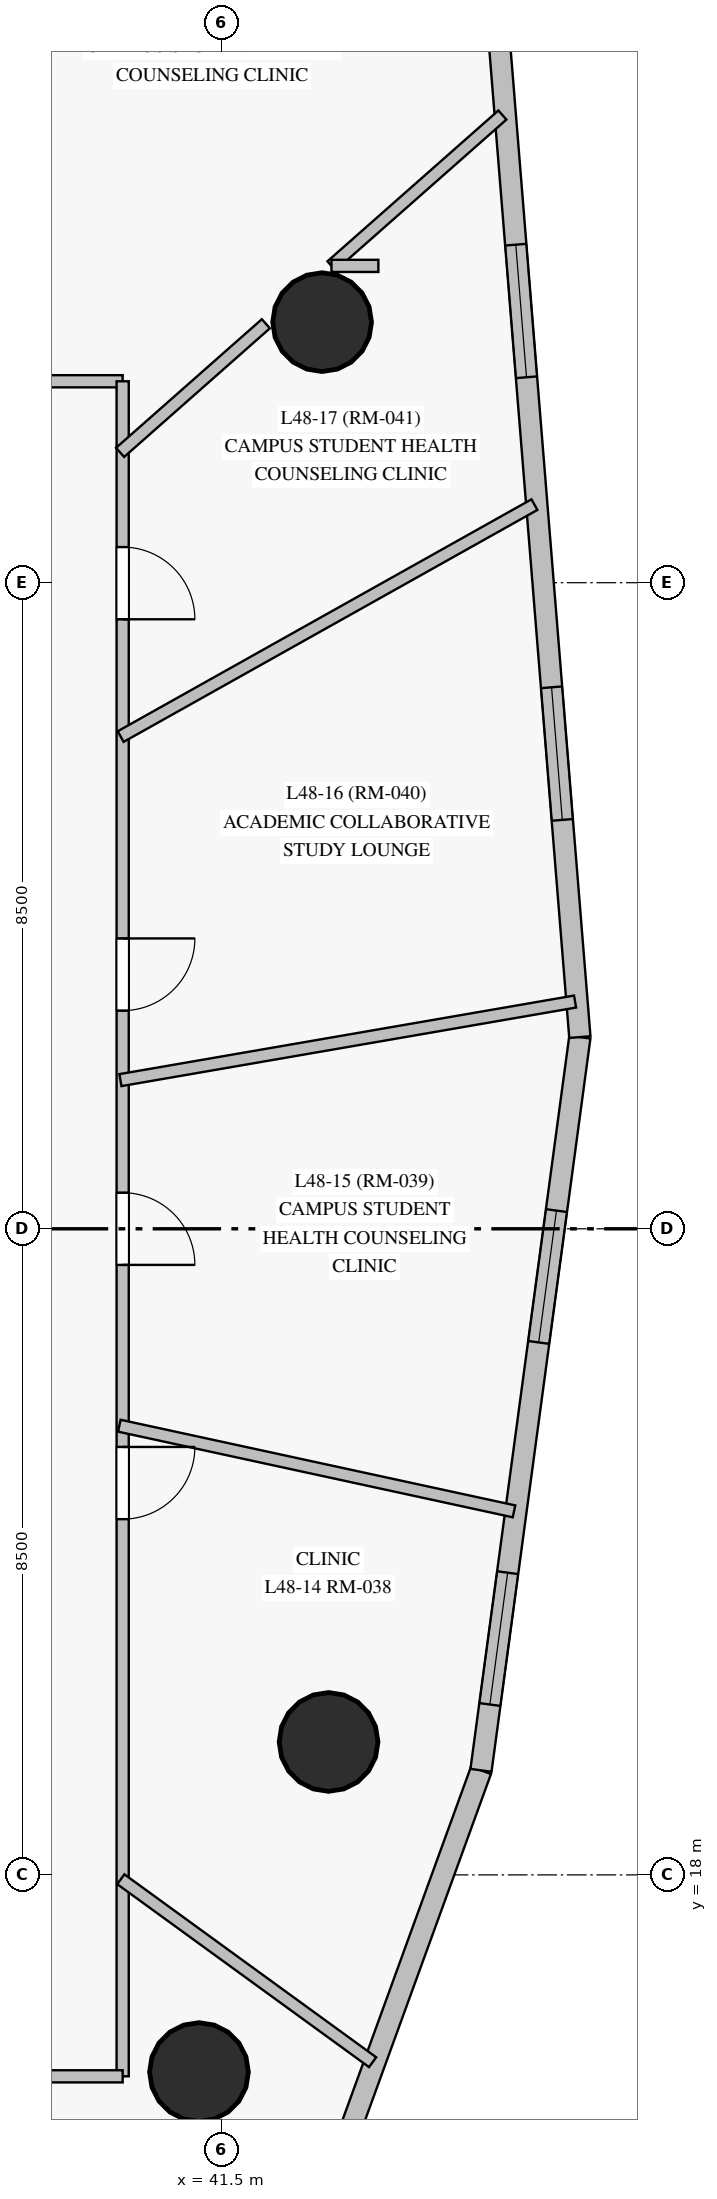
"""IFC4 building model, lengths in metres.
Left out: names, types, materials, properties, quantities, classifications, styles, units other than length and angle.
Written with IfcOpenShell. Run it as: python <this file> out.ifc"""

import sys

from ifc_helpers import new_model, si_unit, direction, frame, frame_2d, origin, origin_with_axes, origin_2d, place, context, subcontext, project, spatial, rectangle, circle, extrude, source, transform, mapped, element, fill, save


model = new_model("IFC4")
c1 = context("Model", 3, precision=1e-05, world=origin(), true_north=direction((0.0, 1.0)))
c2 = subcontext(c1, "Body", "Model", "MODEL_VIEW")
j1 = project(units=[si_unit("LENGTHUNIT", "METRE"), si_unit("PLANEANGLEUNIT", "RADIAN")], contexts=[c1])
p1 = place(None, origin())
s1 = spatial("IfcSite", under=j1, at=p1, CompositionType="ELEMENT")
p2 = place(p1, origin())
s2 = spatial("IfcBuilding", under=s1, at=p2, CompositionType="ELEMENT")
p3 = place(p2, frame((0.0, 0.0, 168.75)))
s3 = spatial("IfcBuildingStorey", under=s2, at=p3, CompositionType="ELEMENT", Elevation=168.75)
m1 = source(origin_with_axes(), c2, "Body", "SweptSolid", [
    extrude(circle(Radius=0.65, at=origin_2d()), origin(), (0.0, 0.0, 1.0), 3.05),
])
for number, where, z_axis, x_axis in (
    (1, (42.909, 19.749, 0.0), (0.0, 0.0, 1.0), (1.0, 0.0, 0.0)),
    (2, (42.824, 38.428, 0.0), (0.0, 0.0, 1.0), (1.0, 0.0, 0.0)),
    (3, (41.204, 15.406, 0.0), (0.0, 0.0, 1.0), (1.0, 0.0, 0.0)),
):
    element("IfcColumn", number, at=place(p3, frame(where, z_axis=z_axis, x_axis=x_axis)), inside=s3, PredefinedType="COLUMN", context=c2, shape_type="MappedRepresentation", body=[
        mapped(m1, transform((0.0, 0.0, 0.0), scale=1.0)),
    ])
p4 = place(p3, frame((40.122, 6.197, 0.0), z_axis=(0.0, 0.0, 1.0), x_axis=(0.341766826374, 0.939784781953, 0.0)))
e4 = element("IfcWall", 4, at=p4, inside=s3, PredefinedType="SOLIDWALL", context=c2, shape_type="SweptSolid", body=[
    extrude(rectangle(XDim=14.023, YDim=0.28, at=frame_2d((7.012, 0.0))), origin(), (0.0, 0.0, 1.0), 2.495),
])
p5 = place(p3, frame((44.914, 19.376, 0.0), z_axis=(0.0, 0.0, 1.0), x_axis=(0.133638943634, 0.9910300867, 0.0)))
e5 = element("IfcWall", 5, at=p5, inside=s3, PredefinedType="SOLIDWALL", context=c2, shape_type="SweptSolid", body=[
    extrude(rectangle(XDim=9.734, YDim=0.28, at=frame_2d((4.867, 0.0))), origin(), (0.0, 0.0, 1.0), 2.825),
])
p6 = place(p5, frame((0.874, 0.0, 0.85)))
e6 = element("IfcOpeningElement", 6, at=p6, cuts=e5, PredefinedType="OPENING", context=c2, shape_type="SweptSolid", body=[
    extrude(rectangle(XDim=1.75, YDim=1.65, at=frame_2d((0.875, 0.825))), frame((0.0, 0.15, 0.0), z_axis=(0.0, -1.0, 0.0), x_axis=(1.0, 0.0, 0.0)), (0.0, 0.0, 1.0), 0.3),
])
p7 = place(p5, frame((5.68, 0.0, 0.85)))
e7 = element("IfcOpeningElement", 7, at=p7, cuts=e5, PredefinedType="OPENING", context=c2, shape_type="SweptSolid", body=[
    extrude(rectangle(XDim=1.75, YDim=1.65, at=frame_2d((0.875, 0.825))), frame((0.0, 0.15, 0.0), z_axis=(0.0, -1.0, 0.0), x_axis=(1.0, 0.0, 0.0)), (0.0, 0.0, 1.0), 0.3),
])
p8 = place(p3, frame((46.215, 29.022, 0.0), z_axis=(0.0, 0.0, 1.0), x_axis=(-0.080623276525, 0.996744644973, 0.0)))
e8 = element("IfcWall", 8, at=p8, inside=s3, PredefinedType="SOLIDWALL", context=c2, shape_type="SweptSolid", body=[
    extrude(rectangle(XDim=14.023, YDim=0.28, at=frame_2d((7.012, 0.0))), origin(), (0.0, 0.0, 1.0), 2.825),
])
p9 = place(p8, frame((2.867, 0.0, 0.85)))
e9 = element("IfcOpeningElement", 9, at=p9, cuts=e8, PredefinedType="OPENING", context=c2, shape_type="SweptSolid", body=[
    extrude(rectangle(XDim=1.75, YDim=1.65, at=frame_2d((0.875, 0.825))), frame((0.0, 0.15, 0.0), z_axis=(0.0, -1.0, 0.0), x_axis=(1.0, 0.0, 0.0)), (0.0, 0.0, 1.0), 0.3),
])
p10 = place(p8, frame((8.709, 0.0, 0.85)))
e10 = element("IfcOpeningElement", 10, at=p10, cuts=e8, PredefinedType="OPENING", context=c2, shape_type="SweptSolid", body=[
    extrude(rectangle(XDim=1.75, YDim=1.65, at=frame_2d((0.875, 0.825))), frame((0.0, 0.15, 0.0), z_axis=(0.0, -1.0, 0.0), x_axis=(1.0, 0.0, 0.0)), (0.0, 0.0, 1.0), 0.3),
])
p11 = place(p3, frame((16.7, 37.65, 0.0), z_axis=(0.0, 0.0, 1.0), x_axis=(1.0, 0.0, 0.0)))
e11 = element("IfcWall", 11, at=p11, inside=s3, PredefinedType="PARTITIONING", context=c2, shape_type="SweptSolid", body=[
    extrude(rectangle(XDim=23.5, YDim=0.16, at=frame_2d((11.75, 0.0))), origin(), (0.0, 0.0, 1.0), 2.375),
])
p12 = place(p11, frame((20.632, 0.0, 0.0)))
e12 = element("IfcOpeningElement", 12, at=p12, cuts=e11, PredefinedType="OPENING", context=c2, shape_type="SweptSolid", body=[
    extrude(rectangle(XDim=0.95, YDim=2.15, at=frame_2d((0.475, 1.075))), frame((0.0, 0.09, 0.0), z_axis=(0.0, -1.0, 0.0), x_axis=(1.0, 0.0, 0.0)), (0.0, 0.0, 1.0), 0.18),
])
p13 = place(p11, frame((17.34, 0.0, 0.0)))
e13 = element("IfcOpeningElement", 13, at=p13, cuts=e11, PredefinedType="OPENING", context=c2, shape_type="SweptSolid", body=[
    extrude(rectangle(XDim=0.95, YDim=2.15, at=frame_2d((0.475, 1.075))), frame((0.0, 0.09, 0.0), z_axis=(0.0, -1.0, 0.0), x_axis=(1.0, 0.0, 0.0)), (0.0, 0.0, 1.0), 0.18),
])
p14 = place(p11, frame((15.24, 0.0, 0.0)))
e14 = element("IfcOpeningElement", 14, at=p14, cuts=e11, PredefinedType="OPENING", context=c2, shape_type="SweptSolid", body=[
    extrude(rectangle(XDim=0.95, YDim=2.15, at=frame_2d((0.475, 1.075))), frame((0.0, 0.09, 0.0), z_axis=(0.0, -1.0, 0.0), x_axis=(1.0, 0.0, 0.0)), (0.0, 0.0, 1.0), 0.18),
])
p15 = place(p11, frame((13.482, 0.0, 0.0)))
e15 = element("IfcOpeningElement", 15, at=p15, cuts=e11, PredefinedType="OPENING", context=c2, shape_type="SweptSolid", body=[
    extrude(rectangle(XDim=0.95, YDim=2.15, at=frame_2d((0.475, 1.075))), frame((0.0, 0.09, 0.0), z_axis=(0.0, -1.0, 0.0), x_axis=(1.0, 0.0, 0.0)), (0.0, 0.0, 1.0), 0.18),
])
p16 = place(p11, frame((11.365, 0.0, 0.0)))
e16 = element("IfcOpeningElement", 16, at=p16, cuts=e11, PredefinedType="OPENING", context=c2, shape_type="SweptSolid", body=[
    extrude(rectangle(XDim=0.95, YDim=2.15, at=frame_2d((0.475, 1.075))), frame((0.0, 0.09, 0.0), z_axis=(0.0, -1.0, 0.0), x_axis=(1.0, 0.0, 0.0)), (0.0, 0.0, 1.0), 0.18),
])
p17 = place(p11, frame((9.588, 0.0, 0.0)))
e17 = element("IfcOpeningElement", 17, at=p17, cuts=e11, PredefinedType="OPENING", context=c2, shape_type="SweptSolid", body=[
    extrude(rectangle(XDim=0.95, YDim=2.15, at=frame_2d((0.475, 1.075))), frame((0.0, 0.09, 0.0), z_axis=(0.0, -1.0, 0.0), x_axis=(1.0, 0.0, 0.0)), (0.0, 0.0, 1.0), 0.18),
])
p18 = place(p11, frame((7.75, 0.0, 0.0)))
e18 = element("IfcOpeningElement", 18, at=p18, cuts=e11, PredefinedType="OPENING", context=c2, shape_type="SweptSolid", body=[
    extrude(rectangle(XDim=0.95, YDim=2.15, at=frame_2d((0.475, 1.075))), frame((0.0, 0.09, 0.0), z_axis=(0.0, -1.0, 0.0), x_axis=(1.0, 0.0, 0.0)), (0.0, 0.0, 1.0), 0.18),
])
p19 = place(p11, frame((5.4, 0.0, 0.0)))
e19 = element("IfcOpeningElement", 19, at=p19, cuts=e11, PredefinedType="OPENING", context=c2, shape_type="SweptSolid", body=[
    extrude(rectangle(XDim=0.95, YDim=2.15, at=frame_2d((0.475, 1.075))), frame((0.0, 0.09, 0.0), z_axis=(0.0, -1.0, 0.0), x_axis=(1.0, 0.0, 0.0)), (0.0, 0.0, 1.0), 0.18),
])
p20 = place(p11, frame((1.277, 0.0, 0.0)))
e20 = element("IfcOpeningElement", 20, at=p20, cuts=e11, PredefinedType="OPENING", context=c2, shape_type="SweptSolid", body=[
    extrude(rectangle(XDim=0.86, YDim=2.04, at=frame_2d((0.43, 1.02))), frame((0.0, 0.09, 0.0), z_axis=(0.0, -1.0, 0.0), x_axis=(1.0, 0.0, 0.0)), (0.0, 0.0, 1.0), 0.18),
])
p21 = place(p3, frame((40.2, 37.65, 0.0), z_axis=(0.0, 0.0, 1.0), x_axis=(0.0, -1.0, 0.0)))
e21 = element("IfcWall", 21, at=p21, inside=s3, PredefinedType="PARTITIONING", context=c2, shape_type="SweptSolid", body=[
    extrude(rectangle(XDim=22.3, YDim=0.16, at=frame_2d((11.15, 0.0))), origin(), (0.0, 0.0, 1.0), 2.375),
])
p22 = place(p21, frame((14.02, 0.0, 0.0)))
e22 = element("IfcOpeningElement", 22, at=p22, cuts=e21, PredefinedType="OPENING", context=c2, shape_type="SweptSolid", body=[
    extrude(rectangle(XDim=0.95, YDim=2.15, at=frame_2d((0.475, 1.075))), frame((0.0, 0.09, 0.0), z_axis=(0.0, -1.0, 0.0), x_axis=(1.0, 0.0, 0.0)), (0.0, 0.0, 1.0), 0.18),
])
p23 = place(p21, frame((10.675, 0.0, 0.0)))
e23 = element("IfcOpeningElement", 23, at=p23, cuts=e21, PredefinedType="OPENING", context=c2, shape_type="SweptSolid", body=[
    extrude(rectangle(XDim=0.95, YDim=2.15, at=frame_2d((0.475, 1.075))), frame((0.0, 0.09, 0.0), z_axis=(0.0, -1.0, 0.0), x_axis=(1.0, 0.0, 0.0)), (0.0, 0.0, 1.0), 0.18),
])
p24 = place(p21, frame((7.33, 0.0, 0.0)))
e24 = element("IfcOpeningElement", 24, at=p24, cuts=e21, PredefinedType="OPENING", context=c2, shape_type="SweptSolid", body=[
    extrude(rectangle(XDim=0.95, YDim=2.15, at=frame_2d((0.475, 1.075))), frame((0.0, 0.09, 0.0), z_axis=(0.0, -1.0, 0.0), x_axis=(1.0, 0.0, 0.0)), (0.0, 0.0, 1.0), 0.18),
])
p25 = place(p21, frame((2.181, 0.0, 0.0)))
e25 = element("IfcOpeningElement", 25, at=p25, cuts=e21, PredefinedType="OPENING", context=c2, shape_type="SweptSolid", body=[
    extrude(rectangle(XDim=0.95, YDim=2.15, at=frame_2d((0.475, 1.075))), frame((0.0, 0.09, 0.0), z_axis=(0.0, -1.0, 0.0), x_axis=(1.0, 0.0, 0.0)), (0.0, 0.0, 1.0), 0.18),
])
p26 = place(p3, frame((35.263, 37.612, 0.0), z_axis=(0.0, 0.0, 1.0), x_axis=(0.515947737753, 0.856620062751, 0.0)))
e26 = element("IfcWall", 26, at=p26, inside=s3, PredefinedType="PARTITIONING", context=c2, shape_type="SweptSolid", body=[
    extrude(rectangle(XDim=10.775, YDim=0.16, at=frame_2d((5.388, 0.0))), origin(), (0.0, 0.0, 1.0), 2.825),
])
p27 = place(p3, frame((40.2, 15.35, 0.0), z_axis=(0.0, 0.0, 1.0), x_axis=(-1.0, 0.0, 0.0)))
e27 = element("IfcWall", 27, at=p27, inside=s3, PredefinedType="PARTITIONING", context=c2, shape_type="SweptSolid", body=[
    extrude(rectangle(XDim=10.65, YDim=0.16, at=frame_2d((5.325, 0.0))), origin(), (0.0, 0.0, 1.0), 2.275),
])
p28 = place(p27, frame((7.752, 0.0, 0.0)))
e28 = element("IfcOpeningElement", 28, at=p28, cuts=e27, PredefinedType="OPENING", context=c2, shape_type="SweptSolid", body=[
    extrude(rectangle(XDim=0.95, YDim=2.15, at=frame_2d((0.475, 1.075))), frame((0.0, 0.09, 0.0), z_axis=(0.0, -1.0, 0.0), x_axis=(1.0, 0.0, 0.0)), (0.0, 0.0, 1.0), 0.18),
])
p29 = place(p27, frame((4.958, 0.0, 0.0)))
e29 = element("IfcOpeningElement", 29, at=p29, cuts=e27, PredefinedType="OPENING", context=c2, shape_type="SweptSolid", body=[
    extrude(rectangle(XDim=0.95, YDim=2.15, at=frame_2d((0.475, 1.075))), frame((0.0, 0.09, 0.0), z_axis=(0.0, -1.0, 0.0), x_axis=(1.0, 0.0, 0.0)), (0.0, 0.0, 1.0), 0.18),
])
p30 = place(p27, frame((2.66, 0.0, 0.0)))
e30 = element("IfcOpeningElement", 30, at=p30, cuts=e27, PredefinedType="OPENING", context=c2, shape_type="SweptSolid", body=[
    extrude(rectangle(XDim=0.95, YDim=2.15, at=frame_2d((0.475, 1.075))), frame((0.0, 0.09, 0.0), z_axis=(0.0, -1.0, 0.0), x_axis=(1.0, 0.0, 0.0)), (0.0, 0.0, 1.0), 0.18),
])
p31 = place(p27, frame((1.562, 0.0, 0.0)))
e31 = element("IfcOpeningElement", 31, at=p31, cuts=e27, PredefinedType="OPENING", context=c2, shape_type="SweptSolid", body=[
    extrude(rectangle(XDim=0.95, YDim=2.15, at=frame_2d((0.475, 1.075))), frame((0.0, 0.09, 0.0), z_axis=(0.0, -1.0, 0.0), x_axis=(1.0, 0.0, 0.0)), (0.0, 0.0, 1.0), 0.18),
])
p32 = place(p3, frame((35.924, 15.387, 0.0), z_axis=(0.0, 0.0, 1.0), x_axis=(0.559237513515, -0.829007480954, 0.0)))
e32 = element("IfcWall", 32, at=p32, inside=s3, PredefinedType="PARTITIONING", context=c2, shape_type="SweptSolid", body=[
    extrude(rectangle(XDim=8.713, YDim=0.16, at=frame_2d((4.357, 0.0))), origin(), (0.0, 0.0, 1.0), 2.825),
])
p33 = place(p3, frame((40.174, 32.976, 0.0), z_axis=(0.0, 0.0, 1.0), x_axis=(0.872285103808, 0.488997645878, 0.0)))
e33 = element("IfcWall", 33, at=p33, inside=s3, PredefinedType="PARTITIONING", context=c2, shape_type="SweptSolid", body=[
    extrude(rectangle(XDim=6.24, YDim=0.16, at=frame_2d((3.12, 0.0))), origin(), (0.0, 0.0, 1.0), 2.825),
])
p34 = place(p3, frame((40.17, 28.456, 0.0), z_axis=(0.0, 0.0, 1.0), x_axis=(0.985393626127, 0.170292106654, 0.0)))
e34 = element("IfcWall", 34, at=p34, inside=s3, PredefinedType="PARTITIONING", context=c2, shape_type="SweptSolid", body=[
    extrude(rectangle(XDim=6.07, YDim=0.16, at=frame_2d((3.035, 0.0))), origin(), (0.0, 0.0, 1.0), 2.825),
])
p35 = place(p3, frame((40.156, 23.909, 0.0), z_axis=(0.0, 0.0, 1.0), x_axis=(0.977257161184, -0.212057635832, 0.0)))
e35 = element("IfcWall", 35, at=p35, inside=s3, PredefinedType="PARTITIONING", context=c2, shape_type="SweptSolid", body=[
    extrude(rectangle(XDim=5.313, YDim=0.16, at=frame_2d((2.657, 0.0))), origin(), (0.0, 0.0, 1.0), 2.825),
])
p36 = place(p3, frame((40.176, 17.943, 0.0), z_axis=(0.0, 0.0, 1.0), x_axis=(0.809001558412, -0.587806497486, 0.0)))
e36 = element("IfcWall", 36, at=p36, inside=s3, PredefinedType="PARTITIONING", context=c2, shape_type="SweptSolid", body=[
    extrude(rectangle(XDim=4.095, YDim=0.16, at=frame_2d((2.047, 0.0))), origin(), (0.0, 0.0, 1.0), 2.825),
])
p37 = place(p3, frame((42.947, 39.168, 0.0), z_axis=(0.0, 0.0, 1.0), x_axis=(0.749811723164, 0.661651252402, 0.0)))
e37 = element("IfcWall", 37, at=p37, inside=s3, PredefinedType="PARTITIONING", context=c2, shape_type="SweptSolid", body=[
    extrude(rectangle(XDim=2.999, YDim=0.16, at=frame_2d((1.5, 0.0))), origin(), (0.0, 0.0, 1.0), 2.825),
])
p38 = place(p3, frame((40.166, 36.714, 0.0), z_axis=(0.0, 0.0, 1.0), x_axis=(0.749832283788, 0.661627951487, 0.0)))
e38 = element("IfcWall", 38, at=p38, inside=s3, PredefinedType="PARTITIONING", context=c2, shape_type="SweptSolid", body=[
    extrude(rectangle(XDim=2.558, YDim=0.16, at=frame_2d((1.279, 0.0))), origin(), (0.0, 0.0, 1.0), 2.275),
])
p39 = place(p3, frame((43.564, 39.168, 0.0), z_axis=(0.0, 0.0, 1.0), x_axis=(-1.0, 0.0, 0.0)))
e39 = element("IfcWall", 39, at=p39, inside=s3, PredefinedType="PARTITIONING", context=c2, shape_type="SweptSolid", body=[
    extrude(rectangle(XDim=0.617, YDim=0.16, at=frame_2d((0.309, 0.0))), origin(), (0.0, 0.0, 1.0), 2.825),
])
m2 = source(origin_with_axes(), c2, "Body", "SweptSolid", [
    extrude(rectangle(XDim=1.75, YDim=1.65, at=frame_2d((0.875, 0.825))), frame((0.0, 0.03, 0.0), z_axis=(0.0, -1.0, 0.0), x_axis=(1.0, 0.0, 0.0)), (0.0, 0.0, 1.0), 0.06),
])
p40 = place(p6, origin())
e40 = element("IfcWindow", 40, at=p40, inside=s3, PartitioningType="SINGLE_PANEL", PredefinedType="WINDOW", context=c2, shape_type="MappedRepresentation", body=[
    mapped(m2, transform((0.0, 0.0, 0.0), scale=1.0)),
])
fill(e6, e40)
p41 = place(p7, origin())
e41 = element("IfcWindow", 41, at=p41, inside=s3, PartitioningType="SINGLE_PANEL", PredefinedType="WINDOW", context=c2, shape_type="MappedRepresentation", body=[
    mapped(m2, transform((0.0, 0.0, 0.0), scale=1.0)),
])
fill(e7, e41)
p42 = place(p9, origin())
e42 = element("IfcWindow", 42, at=p42, inside=s3, PartitioningType="SINGLE_PANEL", PredefinedType="WINDOW", context=c2, shape_type="MappedRepresentation", body=[
    mapped(m2, transform((0.0, 0.0, 0.0), scale=1.0)),
])
fill(e9, e42)
p43 = place(p10, origin())
e43 = element("IfcWindow", 43, at=p43, inside=s3, PartitioningType="SINGLE_PANEL", PredefinedType="WINDOW", context=c2, shape_type="MappedRepresentation", body=[
    mapped(m2, transform((0.0, 0.0, 0.0), scale=1.0)),
])
fill(e10, e43)
m3 = source(origin_with_axes(), c2, "Body", "SweptSolid", [
    extrude(rectangle(XDim=0.95, YDim=2.15, at=frame_2d((0.475, 1.075))), frame((0.0, 0.025, 0.0), z_axis=(0.0, -1.0, 0.0), x_axis=(1.0, 0.0, 0.0)), (0.0, 0.0, 1.0), 0.05),
])
p44 = place(p22, origin())
e44 = element("IfcDoor", 44, at=p44, inside=s3, OperationType="SINGLE_SWING_LEFT", PredefinedType="DOOR", context=c2, shape_type="MappedRepresentation", body=[
    mapped(m3, transform((0.0, 0.0, 0.0), scale=1.0)),
])
fill(e22, e44)
p45 = place(p23, origin())
e45 = element("IfcDoor", 45, at=p45, inside=s3, OperationType="SINGLE_SWING_RIGHT", PredefinedType="DOOR", context=c2, shape_type="MappedRepresentation", body=[
    mapped(m3, transform((0.0, 0.0, 0.0), scale=1.0)),
])
fill(e23, e45)
p46 = place(p24, origin())
e46 = element("IfcDoor", 46, at=p46, inside=s3, OperationType="SINGLE_SWING_LEFT", PredefinedType="DOOR", context=c2, shape_type="MappedRepresentation", body=[
    mapped(m3, transform((0.0, 0.0, 0.0), scale=1.0)),
])
fill(e24, e46)
p47 = place(p25, origin())
e47 = element("IfcDoor", 47, at=p47, inside=s3, OperationType="SINGLE_SWING_RIGHT", PredefinedType="DOOR", context=c2, shape_type="MappedRepresentation", body=[
    mapped(m3, transform((0.0, 0.0, 0.0), scale=1.0)),
])
fill(e25, e47)
save(model, sys.argv[1])
